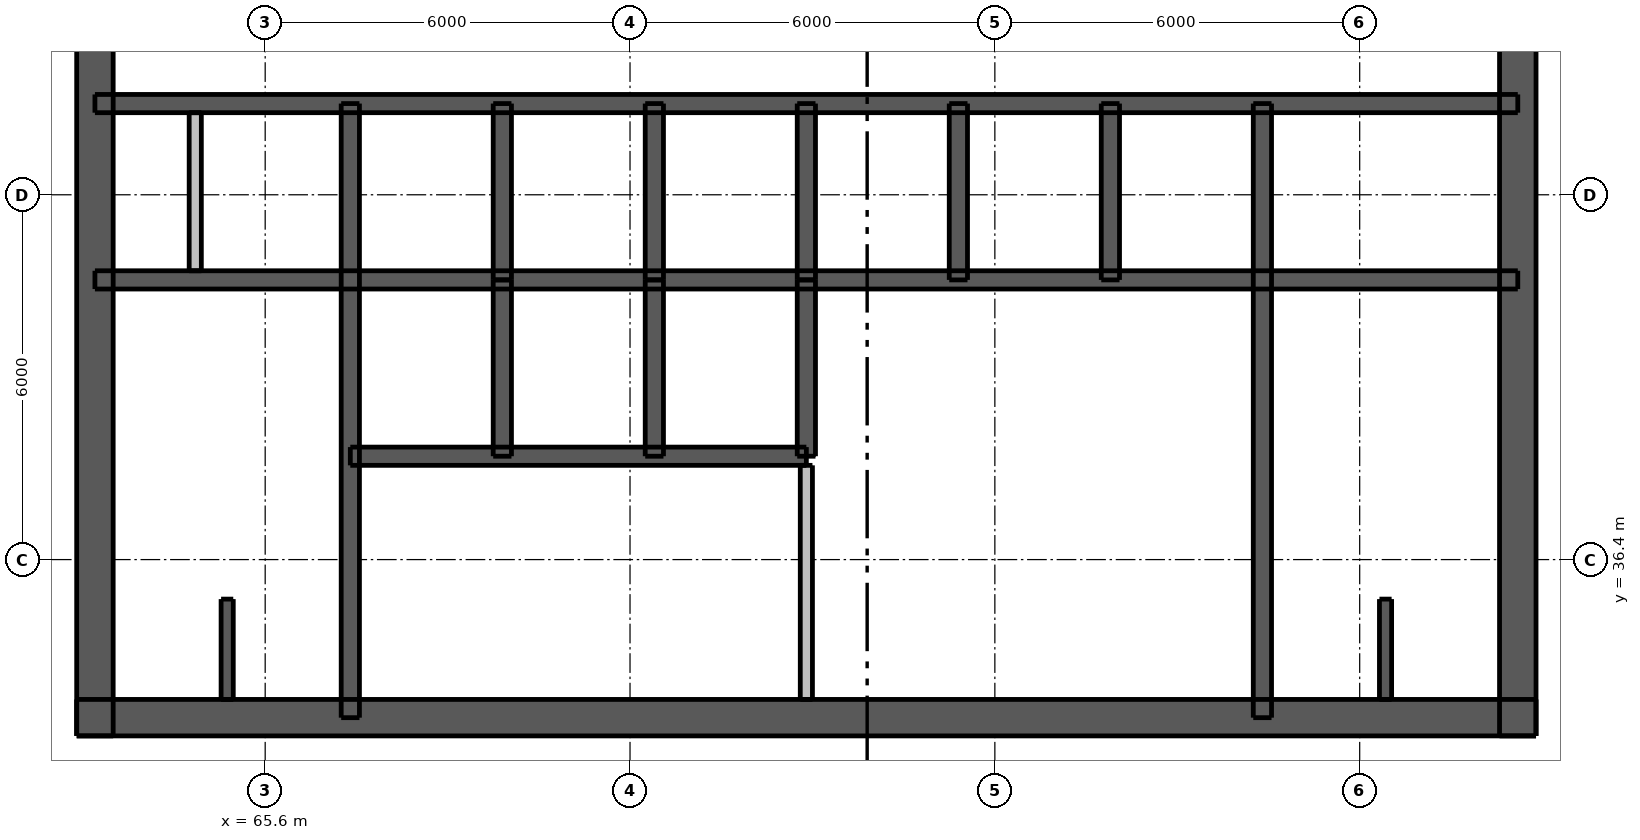
"""IFC4 building model, lengths in metres.
Left out: names, types, materials, properties, quantities, classifications, styles, units other than length and angle.
Written with IfcOpenShell. Run it as: python <this file> out.ifc"""

import sys

from ifc_helpers import new_model, si_unit, direction, frame, frame_2d, origin, place, context, subcontext, project, spatial, rectangle, extrude, element, fill, save


model = new_model("IFC4")
c1 = context("Model", 3, precision=1e-05, world=origin(), true_north=direction((0.0, 1.0)))
c2 = subcontext(c1, "Body", "Model", "MODEL_VIEW")
j1 = project(units=[si_unit("LENGTHUNIT", "METRE"), si_unit("PLANEANGLEUNIT", "RADIAN")], contexts=[c1])
p1 = place(None, origin())
s1 = spatial("IfcSite", under=j1, at=p1, CompositionType="ELEMENT")
p2 = place(p1, origin())
s2 = spatial("IfcBuilding", under=s1, at=p2, CompositionType="ELEMENT")
p3 = place(p2, frame((0.0, 0.0, 229.9)))
s3 = spatial("IfcBuildingStorey", under=s2, at=p3, CompositionType="ELEMENT", Elevation=229.9)
p4 = place(p3, frame((62.5, 33.8, 0.0), z_axis=(0.0, 0.0, 1.0), x_axis=(1.0, 0.0, 0.0)))
e1 = element("IfcWall", 1, at=p4, inside=s3, PredefinedType="SHEAR", context=c2, shape_type="SweptSolid", body=[
    extrude(rectangle(XDim=24.0, YDim=0.6, at=frame_2d((12.0, 0.0))), origin(), (0.0, 0.0, 1.0), 8.75),
])
p5 = place(p4, frame((3.05, 0.0, 0.0)))
e2 = element("IfcOpeningElement", 2, at=p5, cuts=e1, PredefinedType="OPENING", context=c2, shape_type="SweptSolid", body=[
    extrude(rectangle(XDim=1.1, YDim=2.1, at=frame_2d((0.55, 1.05))), frame((0.0, 0.31, 0.0), z_axis=(0.0, -1.0, 0.0), x_axis=(1.0, 0.0, 0.0)), (0.0, 0.0, 1.0), 0.62),
])
p6 = place(p4, frame((0.8, 0.0, 0.0)))
e3 = element("IfcOpeningElement", 3, at=p6, cuts=e1, PredefinedType="OPENING", context=c2, shape_type="SweptSolid", body=[
    extrude(rectangle(XDim=1.1, YDim=2.1, at=frame_2d((0.55, 1.05))), frame((0.0, 0.31, 0.0), z_axis=(0.0, -1.0, 0.0), x_axis=(1.0, 0.0, 0.0)), (0.0, 0.0, 1.0), 0.62),
])
p7 = place(p4, frame((22.1, 0.0, 0.0)))
e4 = element("IfcOpeningElement", 4, at=p7, cuts=e1, PredefinedType="OPENING", context=c2, shape_type="SweptSolid", body=[
    extrude(rectangle(XDim=1.1, YDim=2.1, at=frame_2d((0.55, 1.05))), frame((0.0, 0.31, 0.0), z_axis=(0.0, -1.0, 0.0), x_axis=(1.0, 0.0, 0.0)), (0.0, 0.0, 1.0), 0.62),
])
p8 = place(p4, frame((19.85, 0.0, 0.0)))
e5 = element("IfcOpeningElement", 5, at=p8, cuts=e1, PredefinedType="OPENING", context=c2, shape_type="SweptSolid", body=[
    extrude(rectangle(XDim=1.1, YDim=2.1, at=frame_2d((0.55, 1.05))), frame((0.0, 0.31, 0.0), z_axis=(0.0, -1.0, 0.0), x_axis=(1.0, 0.0, 0.0)), (0.0, 0.0, 1.0), 0.62),
])
p9 = place(p4, frame((7.1, 0.0, 0.0)))
e6 = element("IfcOpeningElement", 6, at=p9, cuts=e1, PredefinedType="OPENING", context=c2, shape_type="SweptSolid", body=[
    extrude(rectangle(XDim=1.1, YDim=2.1, at=frame_2d((0.55, 1.05))), frame((0.0, 0.31, 0.0), z_axis=(0.0, -1.0, 0.0), x_axis=(1.0, 0.0, 0.0)), (0.0, 0.0, 1.0), 0.62),
])
p10 = place(p4, frame((16.1, 0.0, 0.0)))
e7 = element("IfcOpeningElement", 7, at=p10, cuts=e1, PredefinedType="OPENING", context=c2, shape_type="SweptSolid", body=[
    extrude(rectangle(XDim=0.9, YDim=2.1, at=frame_2d((0.45, 1.05))), frame((0.0, 0.31, 0.0), z_axis=(0.0, -1.0, 0.0), x_axis=(1.0, 0.0, 0.0)), (0.0, 0.0, 1.0), 0.62),
])
p11 = place(p3, frame((62.8, 33.5, 0.0), z_axis=(0.0, 0.0, 1.0), x_axis=(0.0, 1.0, 0.0)))
e8 = element("IfcWall", 8, at=p11, inside=s3, PredefinedType="SHEAR", context=c2, shape_type="SweptSolid", body=[
    extrude(rectangle(XDim=24.0, YDim=0.6, at=frame_2d((12.0, 0.0))), origin(), (0.0, 0.0, 1.0), 8.75),
])
p12 = place(p11, frame((11.2, 0.0, 0.0)))
e9 = element("IfcOpeningElement", 9, at=p12, cuts=e8, PredefinedType="OPENING", context=c2, shape_type="SweptSolid", body=[
    extrude(rectangle(XDim=1.6, YDim=2.1, at=frame_2d((0.8, 1.05))), frame((0.0, 0.31, 0.0), z_axis=(0.0, -1.0, 0.0), x_axis=(1.0, 0.0, 0.0)), (0.0, 0.0, 1.0), 0.62),
])
p13 = place(p3, frame((86.2, 33.5, 0.0), z_axis=(0.0, 0.0, 1.0), x_axis=(0.0, 1.0, 0.0)))
e10 = element("IfcWall", 10, at=p13, inside=s3, PredefinedType="SHEAR", context=c2, shape_type="SweptSolid", body=[
    extrude(rectangle(XDim=24.0, YDim=0.6, at=frame_2d((12.0, 0.0))), origin(), (0.0, 0.0, 1.0), 8.75),
])
p14 = place(p13, frame((11.2, 0.0, 0.0)))
e11 = element("IfcOpeningElement", 11, at=p14, cuts=e10, PredefinedType="OPENING", context=c2, shape_type="SweptSolid", body=[
    extrude(rectangle(XDim=1.6, YDim=2.1, at=frame_2d((0.8, 1.05))), frame((0.0, 0.31, 0.0), z_axis=(0.0, -1.0, 0.0), x_axis=(1.0, 0.0, 0.0)), (0.0, 0.0, 1.0), 0.62),
])
p15 = place(p3, frame((62.8, 41.0, 0.0), z_axis=(0.0, 0.0, 1.0), x_axis=(1.0, 0.0, 0.0)))
e12 = element("IfcWall", 12, at=p15, inside=s3, PredefinedType="SHEAR", context=c2, shape_type="SweptSolid", body=[
    extrude(rectangle(XDim=23.4, YDim=0.3, at=frame_2d((11.7, 0.0))), origin(), (0.0, 0.0, 1.0), 8.75),
])
p16 = place(p3, frame((62.8, 43.9, 0.0), z_axis=(0.0, 0.0, 1.0), x_axis=(1.0, 0.0, 0.0)))
e13 = element("IfcWall", 13, at=p16, inside=s3, PredefinedType="SHEAR", context=c2, shape_type="SweptSolid", body=[
    extrude(rectangle(XDim=23.4, YDim=0.3, at=frame_2d((11.7, 0.0))), origin(), (0.0, 0.0, 1.0), 8.75),
])
p17 = place(p16, frame((0.575, 0.0, 0.0)))
e14 = element("IfcOpeningElement", 14, at=p17, cuts=e13, PredefinedType="OPENING", context=c2, shape_type="SweptSolid", body=[
    extrude(rectangle(XDim=0.8, YDim=2.1, at=frame_2d((0.4, 1.05))), frame((0.0, 0.16, 0.0), z_axis=(0.0, -1.0, 0.0), x_axis=(1.0, 0.0, 0.0)), (0.0, 0.0, 1.0), 0.32),
])
p18 = place(p16, frame((2.4, 0.0, 0.0)))
e15 = element("IfcOpeningElement", 15, at=p18, cuts=e13, PredefinedType="OPENING", context=c2, shape_type="SweptSolid", body=[
    extrude(rectangle(XDim=0.9, YDim=2.1, at=frame_2d((0.45, 1.05))), frame((0.0, 0.16, 0.0), z_axis=(0.0, -1.0, 0.0), x_axis=(1.0, 0.0, 0.0)), (0.0, 0.0, 1.0), 0.32),
])
p19 = place(p16, frame((20.775, 0.0, 0.0)))
e16 = element("IfcOpeningElement", 16, at=p19, cuts=e13, PredefinedType="OPENING", context=c2, shape_type="SweptSolid", body=[
    extrude(rectangle(XDim=0.9, YDim=2.1, at=frame_2d((0.45, 1.05))), frame((0.0, 0.16, 0.0), z_axis=(0.0, -1.0, 0.0), x_axis=(1.0, 0.0, 0.0)), (0.0, 0.0, 1.0), 0.32),
])
p20 = place(p16, frame((5.0, 0.0, 0.0)))
e17 = element("IfcOpeningElement", 17, at=p20, cuts=e13, PredefinedType="OPENING", context=c2, shape_type="SweptSolid", body=[
    extrude(rectangle(XDim=0.9, YDim=2.1, at=frame_2d((0.45, 1.05))), frame((0.0, 0.16, 0.0), z_axis=(0.0, -1.0, 0.0), x_axis=(1.0, 0.0, 0.0)), (0.0, 0.0, 1.0), 0.32),
])
p21 = place(p16, frame((10.0, 0.0, 0.0)))
e18 = element("IfcOpeningElement", 18, at=p21, cuts=e13, PredefinedType="OPENING", context=c2, shape_type="SweptSolid", body=[
    extrude(rectangle(XDim=0.9, YDim=2.1, at=frame_2d((0.45, 1.05))), frame((0.0, 0.16, 0.0), z_axis=(0.0, -1.0, 0.0), x_axis=(1.0, 0.0, 0.0)), (0.0, 0.0, 1.0), 0.32),
])
p22 = place(p16, frame((12.5, 0.0, 0.0)))
e19 = element("IfcOpeningElement", 19, at=p22, cuts=e13, PredefinedType="OPENING", context=c2, shape_type="SweptSolid", body=[
    extrude(rectangle(XDim=0.9, YDim=2.1, at=frame_2d((0.45, 1.05))), frame((0.0, 0.16, 0.0), z_axis=(0.0, -1.0, 0.0), x_axis=(1.0, 0.0, 0.0)), (0.0, 0.0, 1.0), 0.32),
])
p23 = place(p16, frame((17.5, 0.0, 0.0)))
e20 = element("IfcOpeningElement", 20, at=p23, cuts=e13, PredefinedType="OPENING", context=c2, shape_type="SweptSolid", body=[
    extrude(rectangle(XDim=0.9, YDim=2.1, at=frame_2d((0.45, 1.05))), frame((0.0, 0.16, 0.0), z_axis=(0.0, -1.0, 0.0), x_axis=(1.0, 0.0, 0.0)), (0.0, 0.0, 1.0), 0.32),
])
for number, where, z_axis, x_axis in (
    (21, (67.0, 33.8, 0.0), (0.0, 0.0, 1.0), (0.0, 1.0, 0.0)),
    (22, (82.0, 33.8, 0.0), (0.0, 0.0, 1.0), (0.0, 1.0, 0.0)),
):
    element("IfcWall", number, at=place(p3, frame(where, z_axis=z_axis, x_axis=x_axis)), inside=s3, PredefinedType="SHEAR", context=c2, shape_type="SweptSolid", body=[
        extrude(rectangle(XDim=10.1, YDim=0.3, at=frame_2d((5.05, 0.0))), origin(), (0.0, 0.0, 1.0), 8.75),
    ])
for number, where, z_axis, x_axis in (
    (23, (69.5, 41.0, 0.0), (0.0, 0.0, 1.0), (0.0, 1.0, 0.0)),
    (24, (72.0, 41.0, 0.0), (0.0, 0.0, 1.0), (0.0, 1.0, 0.0)),
    (25, (74.5, 41.0, 0.0), (0.0, 0.0, 1.0), (0.0, 1.0, 0.0)),
    (26, (77.0, 41.0, 0.0), (0.0, 0.0, 1.0), (0.0, 1.0, 0.0)),
    (27, (79.5, 41.0, 0.0), (0.0, 0.0, 1.0), (0.0, 1.0, 0.0)),
):
    element("IfcWall", number, at=place(p3, frame(where, z_axis=z_axis, x_axis=x_axis)), inside=s3, PredefinedType="SHEAR", context=c2, shape_type="SweptSolid", body=[
        extrude(rectangle(XDim=2.9, YDim=0.3, at=frame_2d((1.45, 0.0))), origin(), (0.0, 0.0, 1.0), 8.75),
    ])
p24 = place(p3, frame((67.0, 38.1, 0.0), z_axis=(0.0, 0.0, 1.0), x_axis=(1.0, 0.0, 0.0)))
e28 = element("IfcWall", 28, at=p24, inside=s3, PredefinedType="SHEAR", context=c2, shape_type="SweptSolid", body=[
    extrude(rectangle(XDim=7.5, YDim=0.3, at=frame_2d((3.75, 0.0))), origin(), (0.0, 0.0, 1.0), 8.75),
])
p25 = place(p24, frame((0.7, 0.0, 0.0)))
e29 = element("IfcOpeningElement", 29, at=p25, cuts=e28, PredefinedType="OPENING", context=c2, shape_type="SweptSolid", body=[
    extrude(rectangle(XDim=1.1, YDim=2.1, at=frame_2d((0.55, 1.05))), frame((0.0, 0.16, 0.0), z_axis=(0.0, -1.0, 0.0), x_axis=(1.0, 0.0, 0.0)), (0.0, 0.0, 1.0), 0.32),
])
p26 = place(p24, frame((3.2, 0.0, 0.0)))
e30 = element("IfcOpeningElement", 30, at=p26, cuts=e28, PredefinedType="OPENING", context=c2, shape_type="SweptSolid", body=[
    extrude(rectangle(XDim=1.1, YDim=2.1, at=frame_2d((0.55, 1.05))), frame((0.0, 0.16, 0.0), z_axis=(0.0, -1.0, 0.0), x_axis=(1.0, 0.0, 0.0)), (0.0, 0.0, 1.0), 0.32),
])
p27 = place(p24, frame((5.65, 0.0, 0.0)))
e31 = element("IfcOpeningElement", 31, at=p27, cuts=e28, PredefinedType="OPENING", context=c2, shape_type="SweptSolid", body=[
    extrude(rectangle(XDim=1.2, YDim=2.1, at=frame_2d((0.6, 1.05))), frame((0.0, 0.16, 0.0), z_axis=(0.0, -1.0, 0.0), x_axis=(1.0, 0.0, 0.0)), (0.0, 0.0, 1.0), 0.32),
])
for number, where, z_axis, x_axis in (
    (32, (69.5, 38.1, 0.0), (0.0, 0.0, 1.0), (0.0, 1.0, 0.0)),
    (33, (72.0, 38.1, 0.0), (0.0, 0.0, 1.0), (0.0, 1.0, 0.0)),
    (34, (74.5, 38.1, 0.0), (0.0, 0.0, 1.0), (0.0, 1.0, 0.0)),
):
    element("IfcWall", number, at=place(p3, frame(where, z_axis=z_axis, x_axis=x_axis)), inside=s3, PredefinedType="SHEAR", context=c2, shape_type="SweptSolid", body=[
        extrude(rectangle(XDim=2.9, YDim=0.3, at=frame_2d((1.45, 0.0))), origin(), (0.0, 0.0, 1.0), 8.75),
    ])
p28 = place(p3, frame((74.5, 34.1, 0.0), z_axis=(0.0, 0.0, 1.0), x_axis=(0.0, 1.0, 0.0)))
e35 = element("IfcWall", 35, at=p28, inside=s3, PredefinedType="PLUMBINGWALL", context=c2, shape_type="SweptSolid", body=[
    extrude(rectangle(XDim=3.85, YDim=0.2, at=frame_2d((1.925, 0.0))), origin(), (0.0, 0.0, 1.0), 8.75),
])
p29 = place(p3, frame((64.45, 41.15, 0.0), z_axis=(0.0, 0.0, 1.0), x_axis=(0.0, 1.0, 0.0)))
e36 = element("IfcWall", 36, at=p29, inside=s3, PredefinedType="PLUMBINGWALL", context=c2, shape_type="SweptSolid", body=[
    extrude(rectangle(XDim=2.6, YDim=0.2, at=frame_2d((1.3, 0.0))), origin(), (0.0, 0.0, 1.0), 8.75),
])
for number, where, z_axis, x_axis in (
    (37, (64.975, 34.1, 0.0), (0.0, 0.0, 1.0), (0.0, 1.0, 0.0)),
    (38, (84.025, 34.1, 0.0), (0.0, 0.0, 1.0), (0.0, 1.0, 0.0)),
):
    element("IfcWall", number, at=place(p3, frame(where, z_axis=z_axis, x_axis=x_axis)), inside=s3, PredefinedType="SHEAR", context=c2, shape_type="SweptSolid", body=[
        extrude(rectangle(XDim=1.65, YDim=0.2, at=frame_2d((0.825, 0.0))), origin(), (0.0, 0.0, 1.0), 8.75),
    ])
p30 = place(p5, origin())
e39 = element("IfcDoor", 39, at=p30, inside=s3, OperationType="SINGLE_SWING_LEFT", PredefinedType="DOOR", context=c2, shape_type="SweptSolid", body=[
    extrude(rectangle(XDim=1.1, YDim=2.1, at=frame_2d((0.55, 1.05))), frame((0.0, 0.288, 0.0), z_axis=(0.0, -1.0, 0.0), x_axis=(1.0, 0.0, 0.0)), (0.0, 0.0, 1.0), 0.05),
])
fill(e2, e39)
p31 = place(p6, origin())
e40 = element("IfcDoor", 40, at=p31, inside=s3, OperationType="SINGLE_SWING_LEFT", PredefinedType="DOOR", context=c2, shape_type="SweptSolid", body=[
    extrude(rectangle(XDim=1.1, YDim=2.1, at=frame_2d((0.55, 1.05))), frame((0.0, 0.288, 0.0), z_axis=(0.0, -1.0, 0.0), x_axis=(1.0, 0.0, 0.0)), (0.0, 0.0, 1.0), 0.05),
])
fill(e3, e40)
p32 = place(p7, origin())
e41 = element("IfcDoor", 41, at=p32, inside=s3, OperationType="SINGLE_SWING_RIGHT", PredefinedType="DOOR", context=c2, shape_type="SweptSolid", body=[
    extrude(rectangle(XDim=1.1, YDim=2.1, at=frame_2d((0.55, 1.05))), frame((0.0, 0.288, 0.0), z_axis=(0.0, -1.0, 0.0), x_axis=(1.0, 0.0, 0.0)), (0.0, 0.0, 1.0), 0.05),
])
fill(e4, e41)
p33 = place(p8, origin())
e42 = element("IfcDoor", 42, at=p33, inside=s3, OperationType="SINGLE_SWING_RIGHT", PredefinedType="DOOR", context=c2, shape_type="SweptSolid", body=[
    extrude(rectangle(XDim=1.1, YDim=2.1, at=frame_2d((0.55, 1.05))), frame((0.0, 0.288, 0.0), z_axis=(0.0, -1.0, 0.0), x_axis=(1.0, 0.0, 0.0)), (0.0, 0.0, 1.0), 0.05),
])
fill(e5, e42)
p34 = place(p12, origin())
e43 = element("IfcDoor", 43, at=p34, inside=s3, OperationType="DOUBLE_DOOR_SINGLE_SWING", PredefinedType="DOOR", context=c2, shape_type="SweptSolid", body=[
    extrude(rectangle(XDim=1.6, YDim=2.1, at=frame_2d((0.8, 1.05))), frame((0.0, -0.237, 0.0), z_axis=(0.0, -1.0, 0.0), x_axis=(1.0, 0.0, 0.0)), (0.0, 0.0, 1.0), 0.05),
])
fill(e9, e43)
p35 = place(p14, origin())
e44 = element("IfcDoor", 44, at=p35, inside=s3, OperationType="DOUBLE_DOOR_SINGLE_SWING", PredefinedType="DOOR", context=c2, shape_type="SweptSolid", body=[
    extrude(rectangle(XDim=1.6, YDim=2.1, at=frame_2d((0.8, 1.05))), frame((0.0, 0.288, 0.0), z_axis=(0.0, -1.0, 0.0), x_axis=(1.0, 0.0, 0.0)), (0.0, 0.0, 1.0), 0.05),
])
fill(e11, e44)
p36 = place(p9, origin())
e45 = element("IfcDoor", 45, at=p36, inside=s3, OperationType="SINGLE_SWING_LEFT", PredefinedType="DOOR", context=c2, shape_type="SweptSolid", body=[
    extrude(rectangle(XDim=1.1, YDim=2.1, at=frame_2d((0.55, 1.05))), frame((0.0, 0.288, 0.0), z_axis=(0.0, -1.0, 0.0), x_axis=(1.0, 0.0, 0.0)), (0.0, 0.0, 1.0), 0.05),
])
fill(e6, e45)
p37 = place(p10, origin())
e46 = element("IfcDoor", 46, at=p37, inside=s3, OperationType="SINGLE_SWING_LEFT", PredefinedType="DOOR", context=c2, shape_type="SweptSolid", body=[
    extrude(rectangle(XDim=0.9, YDim=2.1, at=frame_2d((0.45, 1.05))), frame((0.0, 0.288, 0.0), z_axis=(0.0, -1.0, 0.0), x_axis=(1.0, 0.0, 0.0)), (0.0, 0.0, 1.0), 0.05),
])
fill(e7, e46)
p38 = place(p17, origin())
e47 = element("IfcDoor", 47, at=p38, inside=s3, OperationType="SINGLE_SWING_LEFT", PredefinedType="DOOR", context=c2, shape_type="SweptSolid", body=[
    extrude(rectangle(XDim=0.8, YDim=2.1, at=frame_2d((0.4, 1.05))), frame((0.0, -0.087, 0.0), z_axis=(0.0, -1.0, 0.0), x_axis=(1.0, 0.0, 0.0)), (0.0, 0.0, 1.0), 0.05),
])
fill(e14, e47)
p39 = place(p18, origin())
e48 = element("IfcDoor", 48, at=p39, inside=s3, OperationType="SINGLE_SWING_RIGHT", PredefinedType="DOOR", context=c2, shape_type="SweptSolid", body=[
    extrude(rectangle(XDim=0.9, YDim=2.1, at=frame_2d((0.45, 1.05))), frame((0.0, -0.087, 0.0), z_axis=(0.0, -1.0, 0.0), x_axis=(1.0, 0.0, 0.0)), (0.0, 0.0, 1.0), 0.05),
])
fill(e15, e48)
p40 = place(p19, origin())
e49 = element("IfcDoor", 49, at=p40, inside=s3, OperationType="SINGLE_SWING_LEFT", PredefinedType="DOOR", context=c2, shape_type="SweptSolid", body=[
    extrude(rectangle(XDim=0.9, YDim=2.1, at=frame_2d((0.45, 1.05))), frame((0.0, -0.087, 0.0), z_axis=(0.0, -1.0, 0.0), x_axis=(1.0, 0.0, 0.0)), (0.0, 0.0, 1.0), 0.05),
])
fill(e16, e49)
p41 = place(p20, origin())
e50 = element("IfcDoor", 50, at=p41, inside=s3, OperationType="SINGLE_SWING_RIGHT", PredefinedType="DOOR", context=c2, shape_type="SweptSolid", body=[
    extrude(rectangle(XDim=0.9, YDim=2.1, at=frame_2d((0.45, 1.05))), frame((0.0, -0.087, 0.0), z_axis=(0.0, -1.0, 0.0), x_axis=(1.0, 0.0, 0.0)), (0.0, 0.0, 1.0), 0.05),
])
fill(e17, e50)
p42 = place(p21, origin())
e51 = element("IfcDoor", 51, at=p42, inside=s3, OperationType="SINGLE_SWING_RIGHT", PredefinedType="DOOR", context=c2, shape_type="SweptSolid", body=[
    extrude(rectangle(XDim=0.9, YDim=2.1, at=frame_2d((0.45, 1.05))), frame((0.0, -0.087, 0.0), z_axis=(0.0, -1.0, 0.0), x_axis=(1.0, 0.0, 0.0)), (0.0, 0.0, 1.0), 0.05),
])
fill(e18, e51)
p43 = place(p22, origin())
e52 = element("IfcDoor", 52, at=p43, inside=s3, OperationType="SINGLE_SWING_LEFT", PredefinedType="DOOR", context=c2, shape_type="SweptSolid", body=[
    extrude(rectangle(XDim=0.9, YDim=2.1, at=frame_2d((0.45, 1.05))), frame((0.0, -0.087, 0.0), z_axis=(0.0, -1.0, 0.0), x_axis=(1.0, 0.0, 0.0)), (0.0, 0.0, 1.0), 0.05),
])
fill(e19, e52)
p44 = place(p23, origin())
e53 = element("IfcDoor", 53, at=p44, inside=s3, OperationType="SINGLE_SWING_LEFT", PredefinedType="DOOR", context=c2, shape_type="SweptSolid", body=[
    extrude(rectangle(XDim=0.9, YDim=2.1, at=frame_2d((0.45, 1.05))), frame((0.0, -0.087, 0.0), z_axis=(0.0, -1.0, 0.0), x_axis=(1.0, 0.0, 0.0)), (0.0, 0.0, 1.0), 0.05),
])
fill(e20, e53)
p45 = place(p25, origin())
e54 = element("IfcDoor", 54, at=p45, inside=s3, OperationType="DOUBLE_DOOR_SLIDING", PredefinedType="DOOR", context=c2, shape_type="SweptSolid", body=[
    extrude(rectangle(XDim=1.1, YDim=2.1, at=frame_2d((0.55, 1.05))), frame((0.0, 0.025, 0.0), z_axis=(0.0, -1.0, 0.0), x_axis=(1.0, 0.0, 0.0)), (0.0, 0.0, 1.0), 0.05),
])
fill(e29, e54)
p46 = place(p26, origin())
e55 = element("IfcDoor", 55, at=p46, inside=s3, OperationType="DOUBLE_DOOR_SLIDING", PredefinedType="DOOR", context=c2, shape_type="SweptSolid", body=[
    extrude(rectangle(XDim=1.1, YDim=2.1, at=frame_2d((0.55, 1.05))), frame((0.0, 0.025, 0.0), z_axis=(0.0, -1.0, 0.0), x_axis=(1.0, 0.0, 0.0)), (0.0, 0.0, 1.0), 0.05),
])
fill(e30, e55)
p47 = place(p27, origin())
e56 = element("IfcDoor", 56, at=p47, inside=s3, OperationType="DOUBLE_DOOR_SLIDING", PredefinedType="DOOR", context=c2, shape_type="SweptSolid", body=[
    extrude(rectangle(XDim=1.2, YDim=2.1, at=frame_2d((0.6, 1.05))), frame((0.0, 0.025, 0.0), z_axis=(0.0, -1.0, 0.0), x_axis=(1.0, 0.0, 0.0)), (0.0, 0.0, 1.0), 0.05),
])
fill(e31, e56)
save(model, sys.argv[1])
